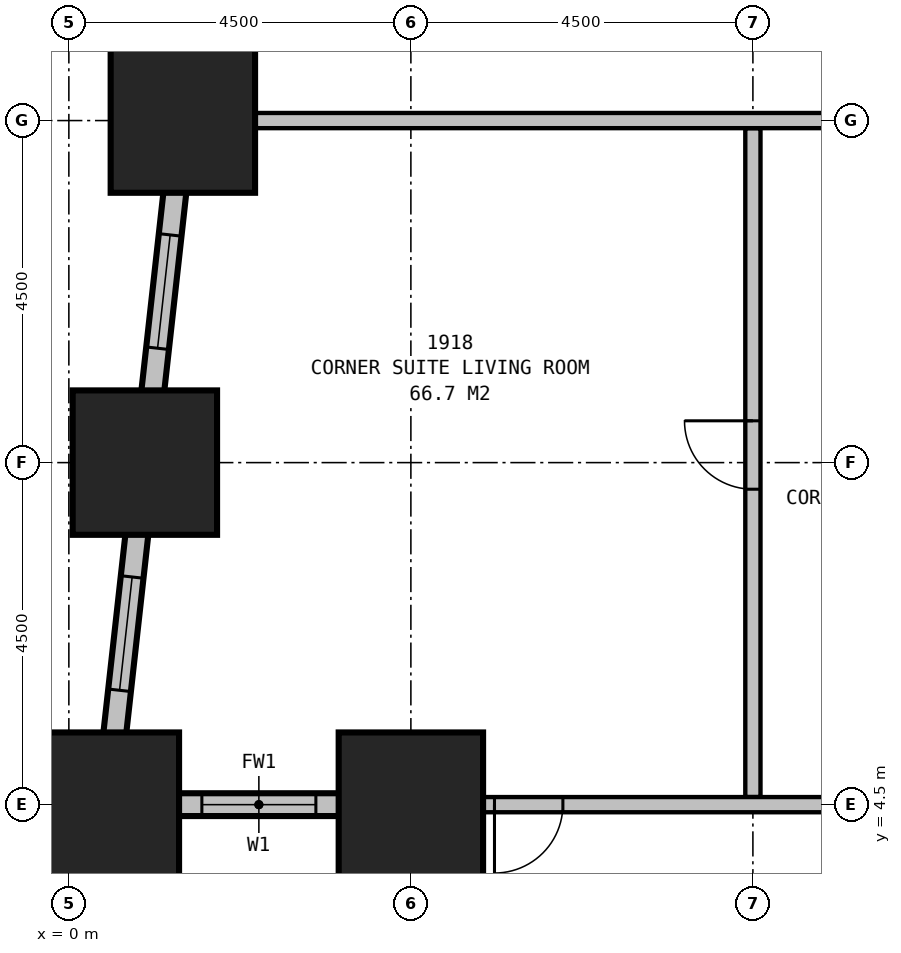
"""IFC4 building model, lengths in metres.
Left out: names, types, materials, properties, quantities, classifications, styles, units other than length and angle.
Written with IfcOpenShell. Run it as: python <this file> out.ifc"""

import sys

from ifc_helpers import new_model, si_unit, direction, frame, frame_2d, origin, origin_2d, place, context, subcontext, project, spatial, rectangle, extrude, element, fill, save


model = new_model("IFC4")
c1 = context("Model", 3, precision=1e-05, world=origin(), true_north=direction((0.0, 1.0)))
c2 = subcontext(c1, "Body", "Model", "MODEL_VIEW")
j1 = project(units=[si_unit("LENGTHUNIT", "METRE"), si_unit("PLANEANGLEUNIT", "RADIAN")], contexts=[c1])
p1 = place(None, origin())
s1 = spatial("IfcSite", under=j1, at=p1, CompositionType="ELEMENT")
p2 = place(p1, origin())
s2 = spatial("IfcBuilding", under=s1, at=p2, CompositionType="ELEMENT")
p3 = place(p2, frame((0.0, 0.0, 78.7)))
s3 = spatial("IfcBuildingStorey", under=s2, at=p3, CompositionType="ELEMENT", Elevation=78.7)
for number, where, z_axis, x_axis in (
    (1, (0.5, 4.5, 0.0), (0.0, 0.0, 1.0), (1.0, 0.0, 0.0)),
    (2, (4.5, 4.5, 0.0), (0.0, 0.0, 1.0), (1.0, 0.0, 0.0)),
    (3, (1.5, 13.5, 0.0), (0.0, 0.0, 1.0), (1.0, 0.0, 0.0)),
    (4, (1.0, 9.0, 0.0), (0.0, 0.0, 1.0), (1.0, 0.0, 0.0)),
):
    element("IfcColumn", number, at=place(p3, frame(where, z_axis=z_axis, x_axis=x_axis)), inside=s3, PredefinedType="COLUMN", context=c2, shape_type="SweptSolid", body=[
        extrude(rectangle(XDim=1.9, YDim=1.9, at=origin_2d()), origin(), (0.0, 0.0, 1.0), 3.5),
    ])
p4 = place(p3, frame((0.35, 4.5, 0.0), z_axis=(0.0, 0.0, 1.0), x_axis=(1.0, 0.0, 0.0)))
e5 = element("IfcWall", 5, at=p4, inside=s3, PredefinedType="STANDARD", context=c2, shape_type="SweptSolid", body=[
    extrude(rectangle(XDim=4.3, YDim=0.3, at=frame_2d((2.15, 0.0))), origin(), (0.0, 0.0, 1.0), 2.05),
])
p5 = place(p4, frame((1.4, 0.0, 0.5)))
e6 = element("IfcOpeningElement", 6, at=p5, cuts=e5, PredefinedType="OPENING", context=c2, shape_type="SweptSolid", body=[
    extrude(rectangle(XDim=1.5, YDim=1.4, at=frame_2d((0.75, 0.7))), frame((0.0, 0.16, 0.0), z_axis=(0.0, -1.0, 0.0), x_axis=(1.0, 0.0, 0.0)), (0.0, 0.0, 1.0), 0.32),
])
p6 = place(p3, frame((4.5, 4.65, 0.0), z_axis=(0.0, 0.0, 1.0), x_axis=(0.0, -1.0, 0.0)))
e7 = element("IfcWall", 7, at=p6, inside=s3, PredefinedType="STANDARD", context=c2, shape_type="SweptSolid", body=[
    extrude(rectangle(XDim=4.8, YDim=0.3, at=frame_2d((2.4, 0.0))), origin(), (0.0, 0.0, 1.0), 2.05),
])
p7 = place(p6, frame((1.65, 0.0, 0.5)))
e8 = element("IfcOpeningElement", 8, at=p7, cuts=e7, PredefinedType="OPENING", context=c2, shape_type="SweptSolid", body=[
    extrude(rectangle(XDim=1.5, YDim=1.4, at=frame_2d((0.75, 0.7))), frame((0.0, 0.16, 0.0), z_axis=(0.0, -1.0, 0.0), x_axis=(1.0, 0.0, 0.0)), (0.0, 0.0, 1.0), 0.32),
])
p8 = place(p3, frame((4.017, 36.149, 0.0), z_axis=(0.0, 0.0, 1.0), x_axis=(-0.110433201132, -0.993883548555, 0.0)))
e9 = element("IfcWall", 9, at=p8, inside=s3, PredefinedType="STANDARD", context=c2, shape_type="SweptSolid", body=[
    extrude(rectangle(XDim=31.994, YDim=0.3, at=frame_2d((15.997, 0.0))), origin(), (0.0, 0.0, 1.0), 2.05),
])
p9 = place(p8, frame((1.664, 0.0, 0.5)))
e10 = element("IfcOpeningElement", 10, at=p9, cuts=e9, PredefinedType="OPENING", context=c2, shape_type="SweptSolid", body=[
    extrude(rectangle(XDim=1.5, YDim=1.4, at=frame_2d((0.75, 0.7))), frame((0.0, 0.16, 0.0), z_axis=(0.0, -1.0, 0.0), x_axis=(1.0, 0.0, 0.0)), (0.0, 0.0, 1.0), 0.32),
])
p10 = place(p8, frame((6.192, 0.0, 0.5)))
e11 = element("IfcOpeningElement", 11, at=p10, cuts=e9, PredefinedType="OPENING", context=c2, shape_type="SweptSolid", body=[
    extrude(rectangle(XDim=1.5, YDim=1.4, at=frame_2d((0.75, 0.7))), frame((0.0, 0.16, 0.0), z_axis=(0.0, -1.0, 0.0), x_axis=(1.0, 0.0, 0.0)), (0.0, 0.0, 1.0), 0.32),
])
p11 = place(p8, frame((10.719, 0.0, 0.5)))
e12 = element("IfcOpeningElement", 12, at=p11, cuts=e9, PredefinedType="OPENING", context=c2, shape_type="SweptSolid", body=[
    extrude(rectangle(XDim=1.5, YDim=1.4, at=frame_2d((0.75, 0.7))), frame((0.0, 0.16, 0.0), z_axis=(0.0, -1.0, 0.0), x_axis=(1.0, 0.0, 0.0)), (0.0, 0.0, 1.0), 0.32),
])
p12 = place(p8, frame((15.247, 0.0, 0.5)))
e13 = element("IfcOpeningElement", 13, at=p12, cuts=e9, PredefinedType="OPENING", context=c2, shape_type="SweptSolid", body=[
    extrude(rectangle(XDim=1.5, YDim=1.4, at=frame_2d((0.75, 0.7))), frame((0.0, 0.16, 0.0), z_axis=(0.0, -1.0, 0.0), x_axis=(1.0, 0.0, 0.0)), (0.0, 0.0, 1.0), 0.32),
])
p13 = place(p8, frame((19.775, 0.0, 0.5)))
e14 = element("IfcOpeningElement", 14, at=p13, cuts=e9, PredefinedType="OPENING", context=c2, shape_type="SweptSolid", body=[
    extrude(rectangle(XDim=1.5, YDim=1.4, at=frame_2d((0.75, 0.7))), frame((0.0, 0.16, 0.0), z_axis=(0.0, -1.0, 0.0), x_axis=(1.0, 0.0, 0.0)), (0.0, 0.0, 1.0), 0.32),
])
p14 = place(p8, frame((24.302, 0.0, 0.5)))
e15 = element("IfcOpeningElement", 15, at=p14, cuts=e9, PredefinedType="OPENING", context=c2, shape_type="SweptSolid", body=[
    extrude(rectangle(XDim=1.5, YDim=1.4, at=frame_2d((0.75, 0.7))), frame((0.0, 0.16, 0.0), z_axis=(0.0, -1.0, 0.0), x_axis=(1.0, 0.0, 0.0)), (0.0, 0.0, 1.0), 0.32),
])
p15 = place(p8, frame((28.83, 0.0, 0.5)))
e16 = element("IfcOpeningElement", 16, at=p15, cuts=e9, PredefinedType="OPENING", context=c2, shape_type="SweptSolid", body=[
    extrude(rectangle(XDim=1.5, YDim=1.4, at=frame_2d((0.75, 0.7))), frame((0.0, 0.16, 0.0), z_axis=(0.0, -1.0, 0.0), x_axis=(1.0, 0.0, 0.0)), (0.0, 0.0, 1.0), 0.32),
])
p16 = place(p3, frame((11.2, 13.5, 0.0), z_axis=(0.0, 0.0, 1.0), x_axis=(-1.0, 0.0, 0.0)))
e17 = element("IfcWall", 17, at=p16, inside=s3, PredefinedType="PARTITIONING", context=c2, shape_type="SweptSolid", body=[
    extrude(rectangle(XDim=9.921, YDim=0.2, at=frame_2d((4.96, 0.0))), origin(), (0.0, 0.0, 1.0), 1.95),
])
p17 = place(p3, frame((13.6, 4.5, 0.0), z_axis=(0.0, 0.0, 1.0), x_axis=(-1.0, 0.0, 0.0)))
e18 = element("IfcWall", 18, at=p17, inside=s3, PredefinedType="PARTITIONING", context=c2, shape_type="SweptSolid", body=[
    extrude(rectangle(XDim=9.1, YDim=0.2, at=frame_2d((4.55, 0.0))), origin(), (0.0, 0.0, 1.0), 3.25),
])
p18 = place(p17, frame((7.1, 0.0, 0.0)))
e19 = element("IfcOpeningElement", 19, at=p18, cuts=e18, PredefinedType="OPENING", context=c2, shape_type="SweptSolid", body=[
    extrude(rectangle(XDim=0.9, YDim=2.1, at=frame_2d((0.45, 1.05))), frame((0.0, 0.11, 0.0), z_axis=(0.0, -1.0, 0.0), x_axis=(1.0, 0.0, 0.0)), (0.0, 0.0, 1.0), 0.22),
])
p19 = place(p3, frame((9.0, 4.6, 0.0), z_axis=(0.0, 0.0, 1.0), x_axis=(0.0, 1.0, 0.0)))
e20 = element("IfcWall", 20, at=p19, inside=s3, PredefinedType="PARTITIONING", context=c2, shape_type="SweptSolid", body=[
    extrude(rectangle(XDim=8.8, YDim=0.2, at=frame_2d((4.4, 0.0))), origin(), (0.0, 0.0, 1.0), 2.25),
])
p20 = place(p19, frame((4.05, 0.0, 0.0)))
e21 = element("IfcOpeningElement", 21, at=p20, cuts=e20, PredefinedType="OPENING", context=c2, shape_type="SweptSolid", body=[
    extrude(rectangle(XDim=0.9, YDim=2.1, at=frame_2d((0.45, 1.05))), frame((0.0, 0.11, 0.0), z_axis=(0.0, -1.0, 0.0), x_axis=(1.0, 0.0, 0.0)), (0.0, 0.0, 1.0), 0.22),
])
p21 = place(p5, origin())
e22 = element("IfcWindow", 22, at=p21, inside=s3, PartitioningType="SINGLE_PANEL", PredefinedType="WINDOW", context=c2, shape_type="SweptSolid", body=[
    extrude(rectangle(XDim=1.5, YDim=1.4, at=frame_2d((0.75, 0.7))), frame((0.0, 0.03, 0.0), z_axis=(0.0, -1.0, 0.0), x_axis=(1.0, 0.0, 0.0)), (0.0, 0.0, 1.0), 0.06),
])
fill(e6, e22)
p22 = place(p14, origin())
e23 = element("IfcWindow", 23, at=p22, inside=s3, PartitioningType="SINGLE_PANEL", PredefinedType="WINDOW", context=c2, shape_type="SweptSolid", body=[
    extrude(rectangle(XDim=1.5, YDim=1.4, at=frame_2d((0.75, 0.7))), frame((0.0, 0.03, 0.0), z_axis=(0.0, -1.0, 0.0), x_axis=(1.0, 0.0, 0.0)), (0.0, 0.0, 1.0), 0.06),
])
fill(e15, e23)
p23 = place(p15, origin())
e24 = element("IfcWindow", 24, at=p23, inside=s3, PartitioningType="SINGLE_PANEL", PredefinedType="WINDOW", context=c2, shape_type="SweptSolid", body=[
    extrude(rectangle(XDim=1.5, YDim=1.4, at=frame_2d((0.75, 0.7))), frame((0.0, 0.03, 0.0), z_axis=(0.0, -1.0, 0.0), x_axis=(1.0, 0.0, 0.0)), (0.0, 0.0, 1.0), 0.06),
])
fill(e16, e24)
p24 = place(p18, origin())
e25 = element("IfcDoor", 25, at=p24, inside=s3, OperationType="SINGLE_SWING_RIGHT", PredefinedType="DOOR", context=c2, shape_type="SweptSolid", body=[
    extrude(rectangle(XDim=0.9, YDim=2.1, at=frame_2d((0.45, 1.05))), frame((0.0, 0.025, 0.0), z_axis=(0.0, -1.0, 0.0), x_axis=(1.0, 0.0, 0.0)), (0.0, 0.0, 1.0), 0.05),
])
fill(e19, e25)
p25 = place(p20, origin())
e26 = element("IfcDoor", 26, at=p25, inside=s3, OperationType="SINGLE_SWING_RIGHT", PredefinedType="DOOR", context=c2, shape_type="SweptSolid", body=[
    extrude(rectangle(XDim=0.9, YDim=2.1, at=frame_2d((0.45, 1.05))), frame((0.0, 0.025, 0.0), z_axis=(0.0, -1.0, 0.0), x_axis=(1.0, 0.0, 0.0)), (0.0, 0.0, 1.0), 0.05),
])
fill(e21, e26)
save(model, sys.argv[1])
